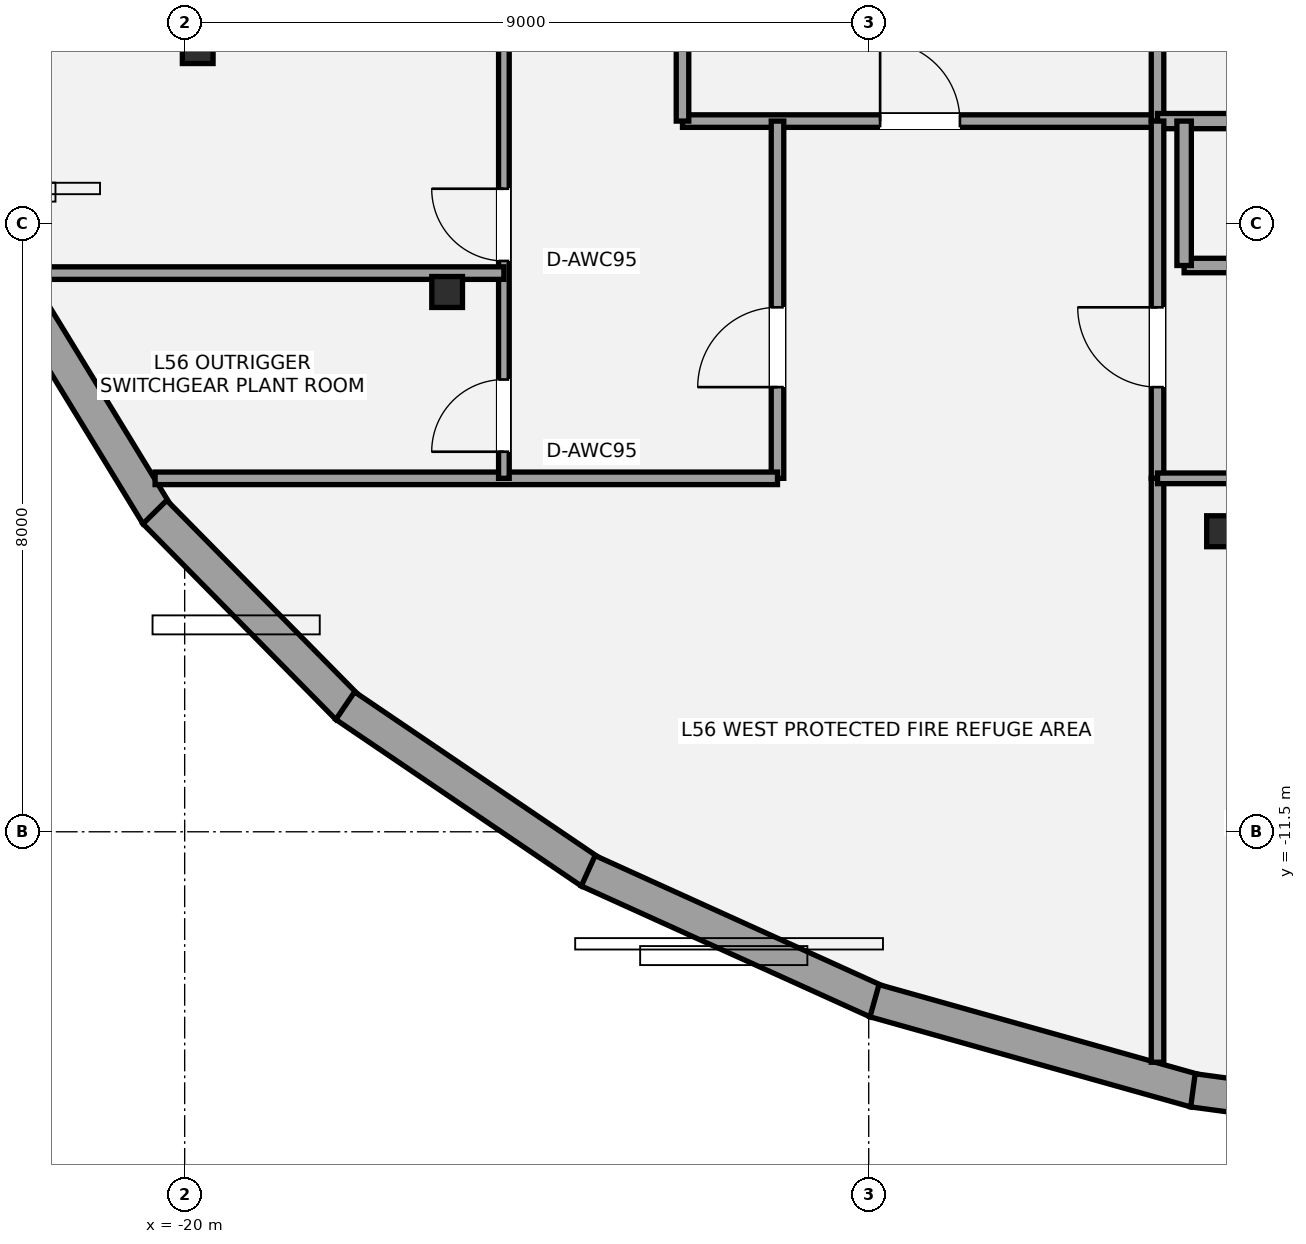
"""IFC4 building model, lengths in metres.
Left out: names, types, materials, properties, quantities, classifications, styles, units other than length and angle.
Written with IfcOpenShell. Run it as: python <this file> out.ifc"""

import sys

from ifc_helpers import new_model, si_unit, direction, frame, frame_2d, origin, origin_2d, place, context, subcontext, project, spatial, rectangle, i_section, extrude, element, fill, save


model = new_model("IFC4")
c1 = context("Model", 3, precision=1e-05, world=origin(), true_north=direction((0.0, 1.0)))
c2 = subcontext(c1, "Body", "Model", "MODEL_VIEW")
j1 = project(units=[si_unit("LENGTHUNIT", "METRE"), si_unit("PLANEANGLEUNIT", "RADIAN")], contexts=[c1])
p1 = place(None, origin())
s1 = spatial("IfcSite", under=j1, at=p1, CompositionType="ELEMENT")
p2 = place(p1, origin())
s2 = spatial("IfcBuilding", under=s1, at=p2, CompositionType="ELEMENT")
p3 = place(p2, frame((0.0, 0.0, 201.4)))
s3 = spatial("IfcBuildingStorey", under=s2, at=p3, CompositionType="ELEMENT", Elevation=201.4)
for number, where, z_axis, x_axis in (
    (1, (-19.828, -1.189, 0.0), (0.0, 0.0, 1.0), (1.0, 0.0, 0.0)),
    (2, (-16.547, -4.398, 0.0), (0.0, 0.0, 1.0), (1.0, 0.0, 0.0)),
    (3, (-6.351, -7.546, 0.0), (0.0, 0.0, 1.0), (1.0, 0.0, 0.0)),
):
    element("IfcColumn", number, at=place(p3, frame(where, z_axis=z_axis, x_axis=x_axis)), inside=s3, PredefinedType="COLUMN", context=c2, shape_type="SweptSolid", body=[
        extrude(i_section(OverallWidth=0.404, OverallDepth=0.407, WebThickness=0.027, FlangeThickness=0.044, at=origin_2d()), origin(), (0.0, 0.0, 1.0), 4.5),
    ])
p4 = place(p3, frame((-20.361, -7.333, 0.0), z_axis=(0.0, 0.0, 1.0), x_axis=(-0.521214394333, 0.853425775999, 0.0)))
e4 = element("IfcWall", 4, at=p4, inside=s3, PredefinedType="STANDARD", context=c2, shape_type="SweptSolid", body=[
    extrude(rectangle(XDim=3.353, YDim=0.44, at=frame_2d((1.677, 0.0))), origin(), (0.0, 0.0, 1.0), 3.575),
])
p5 = place(p3, frame((-17.854, -9.869, 0.0), z_axis=(0.0, 0.0, 1.0), x_axis=(-0.701887992659, 0.712287333708, 0.0)))
e5 = element("IfcWall", 5, at=p5, inside=s3, PredefinedType="STANDARD", context=c2, shape_type="SweptSolid", body=[
    extrude(rectangle(XDim=3.615, YDim=0.44, at=frame_2d((1.808, 0.0))), origin(), (0.0, 0.0, 1.0), 3.575),
])
p6 = place(p3, frame((-14.658, -12.031, 0.0), z_axis=(0.0, 0.0, 1.0), x_axis=(-0.827644957237, 0.561252015373, 0.0)))
e6 = element("IfcWall", 6, at=p6, inside=s3, PredefinedType="STANDARD", context=c2, shape_type="SweptSolid", body=[
    extrude(rectangle(XDim=3.902, YDim=0.44, at=frame_2d((1.951, 0.0))), origin(), (0.0, 0.0, 1.0), 3.575),
])
p7 = place(p3, frame((-10.893, -13.734, 0.0), z_axis=(0.0, 0.0, 1.0), x_axis=(-0.910881102331, 0.412668895624, 0.0)))
e7 = element("IfcWall", 7, at=p7, inside=s3, PredefinedType="STANDARD", context=c2, shape_type="SweptSolid", body=[
    extrude(rectangle(XDim=4.17, YDim=0.44, at=frame_2d((2.085, 0.0))), origin(), (0.0, 0.0, 1.0), 3.575),
])
p8 = place(p3, frame((-6.704, -14.908, 0.0), z_axis=(0.0, 0.0, 1.0), x_axis=(-0.962743881764, 0.270414899969, 0.0)))
e8 = element("IfcWall", 8, at=p8, inside=s3, PredefinedType="STANDARD", context=c2, shape_type="SweptSolid", body=[
    extrude(rectangle(XDim=4.383, YDim=0.44, at=frame_2d((2.192, 0.0))), origin(), (0.0, 0.0, 1.0), 3.575),
])
p9 = place(p3, frame((-2.254, -15.506, 0.0), z_axis=(0.0, 0.0, 1.0), x_axis=(-0.991025333234, 0.133674189316, 0.0)))
e9 = element("IfcWall", 9, at=p9, inside=s3, PredefinedType="STANDARD", context=c2, shape_type="SweptSolid", body=[
    extrude(rectangle(XDim=4.52, YDim=0.44, at=frame_2d((2.26, 0.0))), origin(), (0.0, 0.0, 1.0), 3.575),
])
p10 = place(p3, frame((-13.45, -2.15, 0.0), z_axis=(0.0, 0.0, 1.0), x_axis=(1.0, 0.0, 0.0)))
e10 = element("IfcWall", 10, at=p10, inside=s3, PredefinedType="PARTITIONING", context=c2, shape_type="SweptSolid", body=[
    extrude(rectangle(XDim=6.25, YDim=0.165, at=frame_2d((3.125, 0.0))), origin(), (0.0, 0.0, 1.0), 4.28),
])
p11 = place(p10, frame((2.6, 0.0, 0.0)))
e11 = element("IfcOpeningElement", 11, at=p11, cuts=e10, PredefinedType="OPENING", context=c2, shape_type="SweptSolid", body=[
    extrude(rectangle(XDim=1.05, YDim=2.15, at=frame_2d((0.525, 1.075))), frame((0.0, 0.093, 0.0), z_axis=(0.0, -1.0, 0.0), x_axis=(1.0, 0.0, 0.0)), (0.0, 0.0, 1.0), 0.185),
])
p12 = place(p3, frame((-13.45, -2.15, 0.0), z_axis=(0.0, 0.0, 1.0), x_axis=(0.0, 1.0, 0.0)))
e12 = element("IfcWall", 12, at=p12, inside=s3, PredefinedType="PARTITIONING", context=c2, shape_type="SweptSolid", body=[
    extrude(rectangle(XDim=3.4, YDim=0.165, at=frame_2d((1.7, 0.0))), origin(), (0.0, 0.0, 1.0), 2.47),
])
p13 = place(p3, frame((-7.2, -2.15, 0.0), z_axis=(0.0, 0.0, 1.0), x_axis=(0.0, 1.0, 0.0)))
e13 = element("IfcWall", 13, at=p13, inside=s3, PredefinedType="PARTITIONING", context=c2, shape_type="SweptSolid", body=[
    extrude(rectangle(XDim=3.4, YDim=0.165, at=frame_2d((1.7, 0.0))), origin(), (0.0, 0.0, 1.0), 4.28),
])
p14 = place(p3, frame((-7.2, -2.15, 0.0), z_axis=(0.0, 0.0, 1.0), x_axis=(1.0, 0.0, 0.0)))
e14 = element("IfcWall", 14, at=p14, inside=s3, PredefinedType="SOLIDWALL", context=c2, shape_type="SweptSolid", body=[
    extrude(rectangle(XDim=2.25, YDim=0.2, at=frame_2d((1.125, 0.0))), origin(), (0.0, 0.0, 1.0), 2.47),
])
p15 = place(p3, frame((-6.85, -4.05, 0.0), z_axis=(0.0, 0.0, 1.0), x_axis=(1.0, 0.0, 0.0)))
e15 = element("IfcWall", 15, at=p15, inside=s3, PredefinedType="PLUMBINGWALL", context=c2, shape_type="SweptSolid", body=[
    extrude(rectangle(XDim=4.75, YDim=0.19, at=frame_2d((2.375, 0.0))), origin(), (0.0, 0.0, 1.0), 2.47),
])
p16 = place(p15, frame((1.8, 0.0, 0.0)))
e16 = element("IfcOpeningElement", 16, at=p16, cuts=e15, PredefinedType="OPENING", context=c2, shape_type="SweptSolid", body=[
    extrude(rectangle(XDim=0.9, YDim=2.1, at=frame_2d((0.45, 1.05))), frame((0.0, 0.105, 0.0), z_axis=(0.0, -1.0, 0.0), x_axis=(1.0, 0.0, 0.0)), (0.0, 0.0, 1.0), 0.21),
])
p17 = place(p3, frame((-6.85, -4.05, 0.0), z_axis=(0.0, 0.0, 1.0), x_axis=(0.0, 1.0, 0.0)))
e17 = element("IfcWall", 17, at=p17, inside=s3, PredefinedType="PLUMBINGWALL", context=c2, shape_type="SweptSolid", body=[
    extrude(rectangle(XDim=1.9, YDim=0.19, at=frame_2d((0.95, 0.0))), origin(), (0.0, 0.0, 1.0), 4.28),
])
p18 = place(p3, frame((-12.2, -6.85, 0.0), z_axis=(0.0, 0.0, 1.0), x_axis=(0.0, 1.0, 0.0)))
e18 = element("IfcWall", 18, at=p18, inside=s3, PredefinedType="PARTITIONING", context=c2, shape_type="SweptSolid", body=[
    extrude(rectangle(XDim=4.7, YDim=0.165, at=frame_2d((2.35, 0.0))), origin(), (0.0, 0.0, 1.0), 3.733),
])
p19 = place(p18, frame((1.2, 0.0, 0.0)))
e19 = element("IfcOpeningElement", 19, at=p19, cuts=e18, PredefinedType="OPENING", context=c2, shape_type="SweptSolid", body=[
    extrude(rectangle(XDim=1.05, YDim=2.15, at=frame_2d((0.525, 1.075))), frame((0.0, 0.093, 0.0), z_axis=(0.0, -1.0, 0.0), x_axis=(1.0, 0.0, 0.0)), (0.0, 0.0, 1.0), 0.185),
])
p20 = place(p3, frame((-7.2, -6.85, 0.0), z_axis=(0.0, 0.0, 1.0), x_axis=(0.0, 1.0, 0.0)))
e20 = element("IfcWall", 20, at=p20, inside=s3, PredefinedType="PARTITIONING", context=c2, shape_type="SweptSolid", body=[
    extrude(rectangle(XDim=4.7, YDim=0.165, at=frame_2d((2.35, 0.0))), origin(), (0.0, 0.0, 1.0), 3.733),
])
p21 = place(p20, frame((1.2, 0.0, 0.0)))
e21 = element("IfcOpeningElement", 21, at=p21, cuts=e20, PredefinedType="OPENING", context=c2, shape_type="SweptSolid", body=[
    extrude(rectangle(XDim=1.05, YDim=2.15, at=frame_2d((0.525, 1.075))), frame((0.0, 0.093, 0.0), z_axis=(0.0, -1.0, 0.0), x_axis=(1.0, 0.0, 0.0)), (0.0, 0.0, 1.0), 0.185),
])
p22 = place(p3, frame((-7.2, -14.532, 0.0), z_axis=(0.0, 0.0, 1.0), x_axis=(0.0, 1.0, 0.0)))
e22 = element("IfcWall", 22, at=p22, inside=s3, PredefinedType="PARTITIONING", context=c2, shape_type="SweptSolid", body=[
    extrude(rectangle(XDim=7.682, YDim=0.165, at=frame_2d((3.841, 0.0))), origin(), (0.0, 0.0, 1.0), 3.733),
])
p23 = place(p3, frame((-20.389, -6.85, 0.0), z_axis=(0.0, 0.0, 1.0), x_axis=(1.0, 0.0, 0.0)))
e23 = element("IfcWall", 23, at=p23, inside=s3, PredefinedType="PARTITIONING", context=c2, shape_type="SweptSolid", body=[
    extrude(rectangle(XDim=8.189, YDim=0.165, at=frame_2d((4.095, 0.0))), origin(), (0.0, 0.0, 1.0), 3.733),
])
p24 = place(p3, frame((-7.2, -6.85, 0.0), z_axis=(0.0, 0.0, 1.0), x_axis=(1.0, 0.0, 0.0)))
e24 = element("IfcWall", 24, at=p24, inside=s3, PredefinedType="PARTITIONING", context=c2, shape_type="SweptSolid", body=[
    extrude(rectangle(XDim=14.4, YDim=0.14, at=frame_2d((7.2, 0.0))), origin(), (0.0, 0.0, 1.0), 2.47),
])
p25 = place(p24, frame((1.8, 0.0, 0.0)))
e25 = element("IfcOpeningElement", 25, at=p25, cuts=e24, PredefinedType="OPENING", context=c2, shape_type="SweptSolid", body=[
    extrude(rectangle(XDim=0.95, YDim=2.15, at=frame_2d((0.475, 1.075))), frame((0.0, 0.08, 0.0), z_axis=(0.0, -1.0, 0.0), x_axis=(1.0, 0.0, 0.0)), (0.0, 0.0, 1.0), 0.16),
])
p26 = place(p24, frame((9.0, 0.0, 0.0)))
e26 = element("IfcOpeningElement", 26, at=p26, cuts=e24, PredefinedType="OPENING", context=c2, shape_type="SweptSolid", body=[
    extrude(rectangle(XDim=0.95, YDim=2.15, at=frame_2d((0.475, 1.075))), frame((0.0, 0.08, 0.0), z_axis=(0.0, -1.0, 0.0), x_axis=(1.0, 0.0, 0.0)), (0.0, 0.0, 1.0), 0.16),
])
p27 = place(p3, frame((-15.8, -6.85, 0.0), z_axis=(0.0, 0.0, 1.0), x_axis=(0.0, 1.0, 0.0)))
e27 = element("IfcWall", 27, at=p27, inside=s3, PredefinedType="PARTITIONING", context=c2, shape_type="SweptSolid", body=[
    extrude(rectangle(XDim=12.25, YDim=0.14, at=frame_2d((6.125, 0.0))), origin(), (0.0, 0.0, 1.0), 2.47),
])
p28 = place(p27, frame((0.35, 0.0, 0.0)))
e28 = element("IfcOpeningElement", 28, at=p28, cuts=e27, PredefinedType="OPENING", context=c2, shape_type="SweptSolid", body=[
    extrude(rectangle(XDim=0.95, YDim=2.15, at=frame_2d((0.475, 1.075))), frame((0.0, 0.08, 0.0), z_axis=(0.0, -1.0, 0.0), x_axis=(1.0, 0.0, 0.0)), (0.0, 0.0, 1.0), 0.16),
])
p29 = place(p27, frame((2.86, 0.0, 0.0)))
e29 = element("IfcOpeningElement", 29, at=p29, cuts=e27, PredefinedType="OPENING", context=c2, shape_type="SweptSolid", body=[
    extrude(rectangle(XDim=0.95, YDim=2.15, at=frame_2d((0.475, 1.075))), frame((0.0, 0.08, 0.0), z_axis=(0.0, -1.0, 0.0), x_axis=(1.0, 0.0, 0.0)), (0.0, 0.0, 1.0), 0.16),
])
p30 = place(p3, frame((-21.958, -4.15, 0.0), z_axis=(0.0, 0.0, 1.0), x_axis=(1.0, 0.0, 0.0)))
e30 = element("IfcWall", 30, at=p30, inside=s3, PredefinedType="PARTITIONING", context=c2, shape_type="SweptSolid", body=[
    extrude(rectangle(XDim=6.158, YDim=0.165, at=frame_2d((3.079, 0.0))), origin(), (0.0, 0.0, 1.0), 2.47),
])
p31 = place(p11, origin())
e31 = element("IfcDoor", 31, at=p31, inside=s3, OperationType="SINGLE_SWING_LEFT", PredefinedType="DOOR", context=c2, shape_type="SweptSolid", body=[
    extrude(rectangle(XDim=1.05, YDim=2.15, at=frame_2d((0.525, 1.075))), frame((0.0, 0.025, 0.0), z_axis=(0.0, -1.0, 0.0), x_axis=(1.0, 0.0, 0.0)), (0.0, 0.0, 1.0), 0.05),
])
fill(e11, e31)
p32 = place(p19, origin())
e32 = element("IfcDoor", 32, at=p32, inside=s3, OperationType="SINGLE_SWING_LEFT", PredefinedType="DOOR", context=c2, shape_type="SweptSolid", body=[
    extrude(rectangle(XDim=1.05, YDim=2.15, at=frame_2d((0.525, 1.075))), frame((0.0, 0.025, 0.0), z_axis=(0.0, -1.0, 0.0), x_axis=(1.0, 0.0, 0.0)), (0.0, 0.0, 1.0), 0.05),
])
fill(e19, e32)
p33 = place(p21, origin())
e33 = element("IfcDoor", 33, at=p33, inside=s3, OperationType="SINGLE_SWING_RIGHT", PredefinedType="DOOR", context=c2, shape_type="SweptSolid", body=[
    extrude(rectangle(XDim=1.05, YDim=2.15, at=frame_2d((0.525, 1.075))), frame((0.0, 0.025, 0.0), z_axis=(0.0, -1.0, 0.0), x_axis=(1.0, 0.0, 0.0)), (0.0, 0.0, 1.0), 0.05),
])
fill(e21, e33)
p34 = place(p28, origin())
e34 = element("IfcDoor", 34, at=p34, inside=s3, OperationType="SINGLE_SWING_LEFT", PredefinedType="DOOR", context=c2, shape_type="SweptSolid", body=[
    extrude(rectangle(XDim=0.95, YDim=2.15, at=frame_2d((0.475, 1.075))), frame((0.0, 0.025, 0.0), z_axis=(0.0, -1.0, 0.0), x_axis=(1.0, 0.0, 0.0)), (0.0, 0.0, 1.0), 0.05),
])
fill(e28, e34)
p35 = place(p29, origin())
e35 = element("IfcDoor", 35, at=p35, inside=s3, OperationType="SINGLE_SWING_RIGHT", PredefinedType="DOOR", context=c2, shape_type="SweptSolid", body=[
    extrude(rectangle(XDim=0.95, YDim=2.15, at=frame_2d((0.475, 1.075))), frame((0.0, 0.025, 0.0), z_axis=(0.0, -1.0, 0.0), x_axis=(1.0, 0.0, 0.0)), (0.0, 0.0, 1.0), 0.05),
])
fill(e29, e35)
save(model, sys.argv[1])
